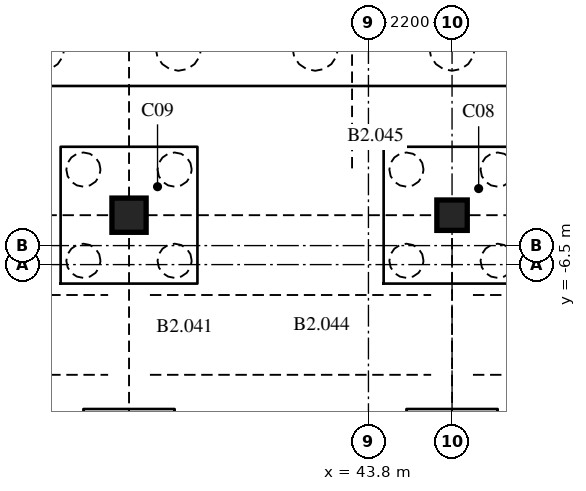
"""IFC4 building model, lengths in metres.
Left out: names, types, materials, properties, quantities, classifications, styles, units other than length and angle.
Written with IfcOpenShell. Run it as: python <this file> out.ifc"""

import sys

from ifc_helpers import new_model, si_unit, direction, frame, origin, origin_2d, place, context, subcontext, project, spatial, rectangle, extrude, element, save


model = new_model("IFC4")
c1 = context("Model", 3, precision=1e-05, world=origin(), true_north=direction((0.0, 1.0)))
c2 = subcontext(c1, "Body", "Model", "MODEL_VIEW")
j1 = project(units=[si_unit("LENGTHUNIT", "METRE"), si_unit("PLANEANGLEUNIT", "RADIAN")], contexts=[c1])
p1 = place(None, origin())
s1 = spatial("IfcSite", under=j1, at=p1, CompositionType="ELEMENT")
p2 = place(p1, origin())
s2 = spatial("IfcBuilding", under=s1, at=p2, CompositionType="ELEMENT")
p3 = place(p2, frame((0.0, 0.0, -7.5)))
s3 = spatial("IfcBuildingStorey", under=s2, at=p3, CompositionType="ELEMENT", Elevation=-7.5)
p4 = place(p3, frame((37.5, -5.2, -0.6), z_axis=(0.0, 0.0, 1.0), x_axis=(1.0, 0.0, 0.0)))
e1 = element("IfcColumn", 1, at=p4, inside=s3, PredefinedType="COLUMN", context=c2, shape_type="SweptSolid", body=[
    extrude(rectangle(XDim=0.9, YDim=0.9, at=origin_2d()), origin(), (0.0, 0.0, 1.0), 4.1),
])
p5 = place(p3, frame((46.0, -5.2, -0.6), z_axis=(0.0, 0.0, 1.0), x_axis=(1.0, 0.0, 0.0)))
e2 = element("IfcColumn", 2, at=p5, inside=s3, PredefinedType="COLUMN", context=c2, shape_type="SweptSolid", body=[
    extrude(rectangle(XDim=0.8, YDim=0.8, at=origin_2d()), origin(), (0.0, 0.0, 1.0), 4.1),
])
save(model, sys.argv[1])
